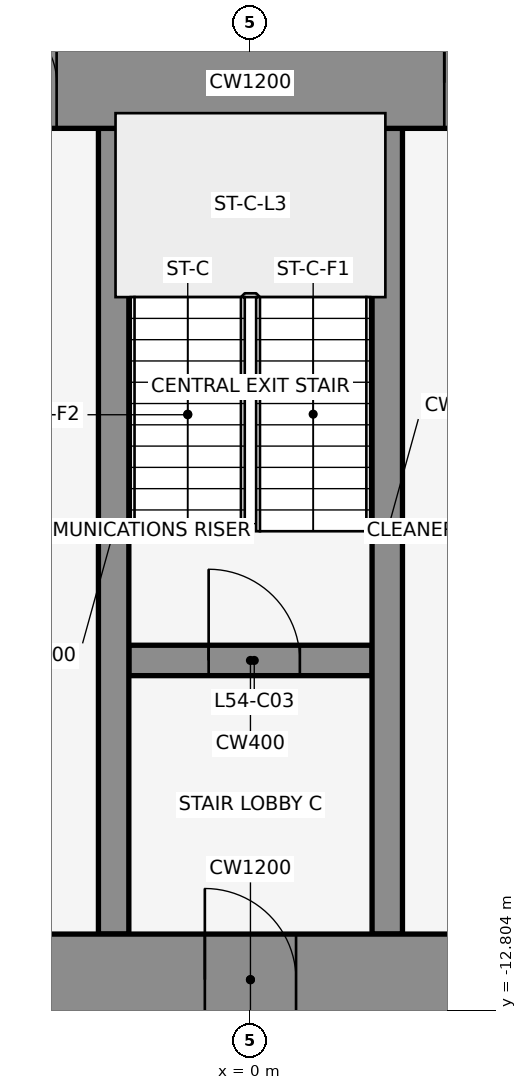
"""IFC4 building model, lengths in metres.
Left out: names, types, materials, properties, quantities, classifications, styles, units other than length and angle.
Written with IfcOpenShell. Run it as: python <this file> out.ifc"""

import sys

from ifc_helpers import new_model, si_unit, direction, frame, frame_2d, origin, place, context, subcontext, project, spatial, rectangle, extrude, element, fill, save


model = new_model("IFC4")
c1 = context("Model", 3, precision=1e-05, world=origin(), true_north=direction((0.0, 1.0)))
c2 = subcontext(c1, "Body", "Model", "MODEL_VIEW")
j1 = project(units=[si_unit("LENGTHUNIT", "METRE"), si_unit("PLANEANGLEUNIT", "RADIAN")], contexts=[c1])
p1 = place(None, origin())
s1 = spatial("IfcSite", under=j1, at=p1, CompositionType="ELEMENT")
p2 = place(p1, origin())
s2 = spatial("IfcBuilding", under=s1, at=p2, CompositionType="ELEMENT")
p3 = place(p2, frame((0.0, 0.0, 241.4)))
s3 = spatial("IfcBuildingStorey", under=s2, at=p3, CompositionType="ELEMENT", Elevation=241.4)
for number, where, z_axis, x_axis in (
    (1, (1.901, 1.08, 0.0), (0.0, 0.0, 1.0), (-0.84, -0.543, 0.0)),
    (2, (-0.068, -0.105, 0.0), (0.0, 0.0, 1.0), (-0.84, 0.543, 0.0)),
):
    element("IfcWall", number, at=place(p3, frame(where, z_axis=z_axis, x_axis=x_axis)), inside=s3, PredefinedType="STANDARD", context=c2, shape_type="SweptSolid", body=[
        extrude(rectangle(XDim=2.183, YDim=0.25, at=frame_2d((1.091, 0.0))), origin(), (0.0, 0.0, 1.0), 4.05),
    ])
p4 = place(p3, frame((-1.6, -8.2, 0.0), z_axis=(0.0, 0.0, 1.0), x_axis=(1.0, 0.0, 0.0)))
e3 = element("IfcWall", 3, at=p4, inside=s3, PredefinedType="SHEAR", context=c2, shape_type="SweptSolid", body=[
    extrude(rectangle(XDim=3.2, YDim=0.4, at=frame_2d((1.6, 0.0))), origin(), (0.0, 0.0, 1.0), 4.2),
])
p5 = place(p4, frame((1.05, 0.0, 0.0)))
e4 = element("IfcOpeningElement", 4, at=p5, cuts=e3, PredefinedType="OPENING", context=c2, shape_type="SweptSolid", body=[
    extrude(rectangle(XDim=1.2, YDim=2.1, at=frame_2d((0.6, 1.05))), frame((0.0, 0.212, 0.0), z_axis=(0.0, -1.0, 0.0), x_axis=(1.0, 0.0, 0.0)), (0.0, 0.0, 1.0), 0.424),
])
for number, where, z_axis, x_axis in (
    (5, (-1.8, -11.8, 0.0), (0.0, 0.0, 1.0), (0.0, 1.0, 0.0)),
    (6, (1.8, -11.8, 0.0), (0.0, 0.0, 1.0), (0.0, 1.0, 0.0)),
):
    element("IfcWall", number, at=place(p3, frame(where, z_axis=z_axis, x_axis=x_axis)), inside=s3, PredefinedType="SHEAR", context=c2, shape_type="SweptSolid", body=[
        extrude(rectangle(XDim=10.6, YDim=0.4, at=frame_2d((5.3, 0.0))), origin(), (0.0, 0.0, 1.0), 4.2),
    ])
p6 = place(p3, frame((-22.0, -0.6, 0.0), z_axis=(0.0, 0.0, 1.0), x_axis=(1.0, 0.0, 0.0)))
e7 = element("IfcWall", 7, at=p6, inside=s3, PredefinedType="SHEAR", context=c2, shape_type="SweptSolid", body=[
    extrude(rectangle(XDim=44.0, YDim=1.2, at=frame_2d((22.0, 0.0))), origin(), (0.0, 0.0, 1.0), 4.2),
])
p7 = place(p6, frame((18.55, 0.0, 0.0)))
e8 = element("IfcOpeningElement", 8, at=p7, cuts=e7, PredefinedType="OPENING", context=c2, shape_type="SweptSolid", body=[
    extrude(rectangle(XDim=0.9, YDim=2.1, at=frame_2d((0.45, 1.05))), frame((0.0, 0.612, 0.0), z_axis=(0.0, -1.0, 0.0), x_axis=(1.0, 0.0, 0.0)), (0.0, 0.0, 1.0), 1.224),
])
p8 = place(p6, frame((24.55, 0.0, 0.0)))
e9 = element("IfcOpeningElement", 9, at=p8, cuts=e7, PredefinedType="OPENING", context=c2, shape_type="SweptSolid", body=[
    extrude(rectangle(XDim=0.9, YDim=2.1, at=frame_2d((0.45, 1.05))), frame((0.0, 0.612, 0.0), z_axis=(0.0, -1.0, 0.0), x_axis=(1.0, 0.0, 0.0)), (0.0, 0.0, 1.0), 1.224),
])
p9 = place(p3, frame((-22.0, -12.4, 0.0), z_axis=(0.0, 0.0, 1.0), x_axis=(1.0, 0.0, 0.0)))
e10 = element("IfcWall", 10, at=p9, inside=s3, PredefinedType="SHEAR", context=c2, shape_type="SweptSolid", body=[
    extrude(rectangle(XDim=44.0, YDim=1.2, at=frame_2d((22.0, 0.0))), origin(), (0.0, 0.0, 1.0), 4.2),
])
p10 = place(p9, frame((2.2, 0.0, 0.0)))
e11 = element("IfcOpeningElement", 11, at=p10, cuts=e10, PredefinedType="OPENING", context=c2, shape_type="SweptSolid", body=[
    extrude(rectangle(XDim=1.2, YDim=2.1, at=frame_2d((0.6, 1.05))), frame((0.0, 0.612, 0.0), z_axis=(0.0, -1.0, 0.0), x_axis=(1.0, 0.0, 0.0)), (0.0, 0.0, 1.0), 1.224),
])
p11 = place(p9, frame((21.4, 0.0, 0.0)))
e12 = element("IfcOpeningElement", 12, at=p11, cuts=e10, PredefinedType="OPENING", context=c2, shape_type="SweptSolid", body=[
    extrude(rectangle(XDim=1.2, YDim=2.1, at=frame_2d((0.6, 1.05))), frame((0.0, 0.612, 0.0), z_axis=(0.0, -1.0, 0.0), x_axis=(1.0, 0.0, 0.0)), (0.0, 0.0, 1.0), 1.224),
])
p12 = place(p9, frame((40.6, 0.0, 0.0)))
e13 = element("IfcOpeningElement", 13, at=p12, cuts=e10, PredefinedType="OPENING", context=c2, shape_type="SweptSolid", body=[
    extrude(rectangle(XDim=1.2, YDim=2.1, at=frame_2d((0.6, 1.05))), frame((0.0, 0.612, 0.0), z_axis=(0.0, -1.0, 0.0), x_axis=(1.0, 0.0, 0.0)), (0.0, 0.0, 1.0), 1.224),
])
p13 = place(p9, frame((16.0, 0.0, 0.0)))
e14 = element("IfcOpeningElement", 14, at=p13, cuts=e10, PredefinedType="OPENING", context=c2, shape_type="SweptSolid", body=[
    extrude(rectangle(XDim=1.8, YDim=2.1, at=frame_2d((0.9, 1.05))), frame((0.0, 0.612, 0.0), z_axis=(0.0, -1.0, 0.0), x_axis=(1.0, 0.0, 0.0)), (0.0, 0.0, 1.0), 1.224),
])
p14 = place(p9, frame((6.3, 0.0, 0.0)))
e15 = element("IfcOpeningElement", 15, at=p14, cuts=e10, PredefinedType="OPENING", context=c2, shape_type="SweptSolid", body=[
    extrude(rectangle(XDim=1.2, YDim=2.1, at=frame_2d((0.6, 1.05))), frame((0.0, 0.612, 0.0), z_axis=(0.0, -1.0, 0.0), x_axis=(1.0, 0.0, 0.0)), (0.0, 0.0, 1.0), 1.224),
])
p15 = place(p9, frame((26.2, 0.0, 0.0)))
e16 = element("IfcOpeningElement", 16, at=p15, cuts=e10, PredefinedType="OPENING", context=c2, shape_type="SweptSolid", body=[
    extrude(rectangle(XDim=1.8, YDim=2.1, at=frame_2d((0.9, 1.05))), frame((0.0, 0.612, 0.0), z_axis=(0.0, -1.0, 0.0), x_axis=(1.0, 0.0, 0.0)), (0.0, 0.0, 1.0), 1.224),
])
p16 = place(p9, frame((36.5, 0.0, 0.0)))
e17 = element("IfcOpeningElement", 17, at=p16, cuts=e10, PredefinedType="OPENING", context=c2, shape_type="SweptSolid", body=[
    extrude(rectangle(XDim=1.2, YDim=2.1, at=frame_2d((0.6, 1.05))), frame((0.0, 0.612, 0.0), z_axis=(0.0, -1.0, 0.0), x_axis=(1.0, 0.0, 0.0)), (0.0, 0.0, 1.0), 1.224),
])
p17 = place(p5, origin())
e18 = element("IfcDoor", 18, at=p17, inside=s3, OperationType="SINGLE_SWING_LEFT", PredefinedType="DOOR", context=c2, shape_type="SweptSolid", body=[
    extrude(rectangle(XDim=1.2, YDim=2.1, at=frame_2d((0.6, 1.05))), frame((0.0, 0.025, 0.0), z_axis=(0.0, -1.0, 0.0), x_axis=(1.0, 0.0, 0.0)), (0.0, 0.0, 1.0), 0.05),
])
fill(e4, e18)
p18 = place(p7, origin())
e19 = element("IfcDoor", 19, at=p18, inside=s3, OperationType="SINGLE_SWING_LEFT", PredefinedType="DOOR", context=c2, shape_type="SweptSolid", body=[
    extrude(rectangle(XDim=0.9, YDim=2.1, at=frame_2d((0.45, 1.05))), frame((0.0, 0.025, 0.0), z_axis=(0.0, -1.0, 0.0), x_axis=(1.0, 0.0, 0.0)), (0.0, 0.0, 1.0), 0.05),
])
fill(e8, e19)
p19 = place(p8, origin())
e20 = element("IfcDoor", 20, at=p19, inside=s3, OperationType="SINGLE_SWING_LEFT", PredefinedType="DOOR", context=c2, shape_type="SweptSolid", body=[
    extrude(rectangle(XDim=0.9, YDim=2.1, at=frame_2d((0.45, 1.05))), frame((0.0, 0.025, 0.0), z_axis=(0.0, -1.0, 0.0), x_axis=(1.0, 0.0, 0.0)), (0.0, 0.0, 1.0), 0.05),
])
fill(e9, e20)
p20 = place(p11, frame((1.2, 0.0, 0.0), z_axis=(0.0, 0.0, 1.0), x_axis=(-1.0, 0.0, 0.0)))
e21 = element("IfcDoor", 21, at=p20, inside=s3, OperationType="SINGLE_SWING_RIGHT", PredefinedType="DOOR", context=c2, shape_type="SweptSolid", body=[
    extrude(rectangle(XDim=1.2, YDim=2.1, at=frame_2d((0.6, 1.05))), frame((0.0, 0.025, 0.0), z_axis=(0.0, -1.0, 0.0), x_axis=(1.0, 0.0, 0.0)), (0.0, 0.0, 1.0), 0.05),
])
fill(e12, e21)
save(model, sys.argv[1])
